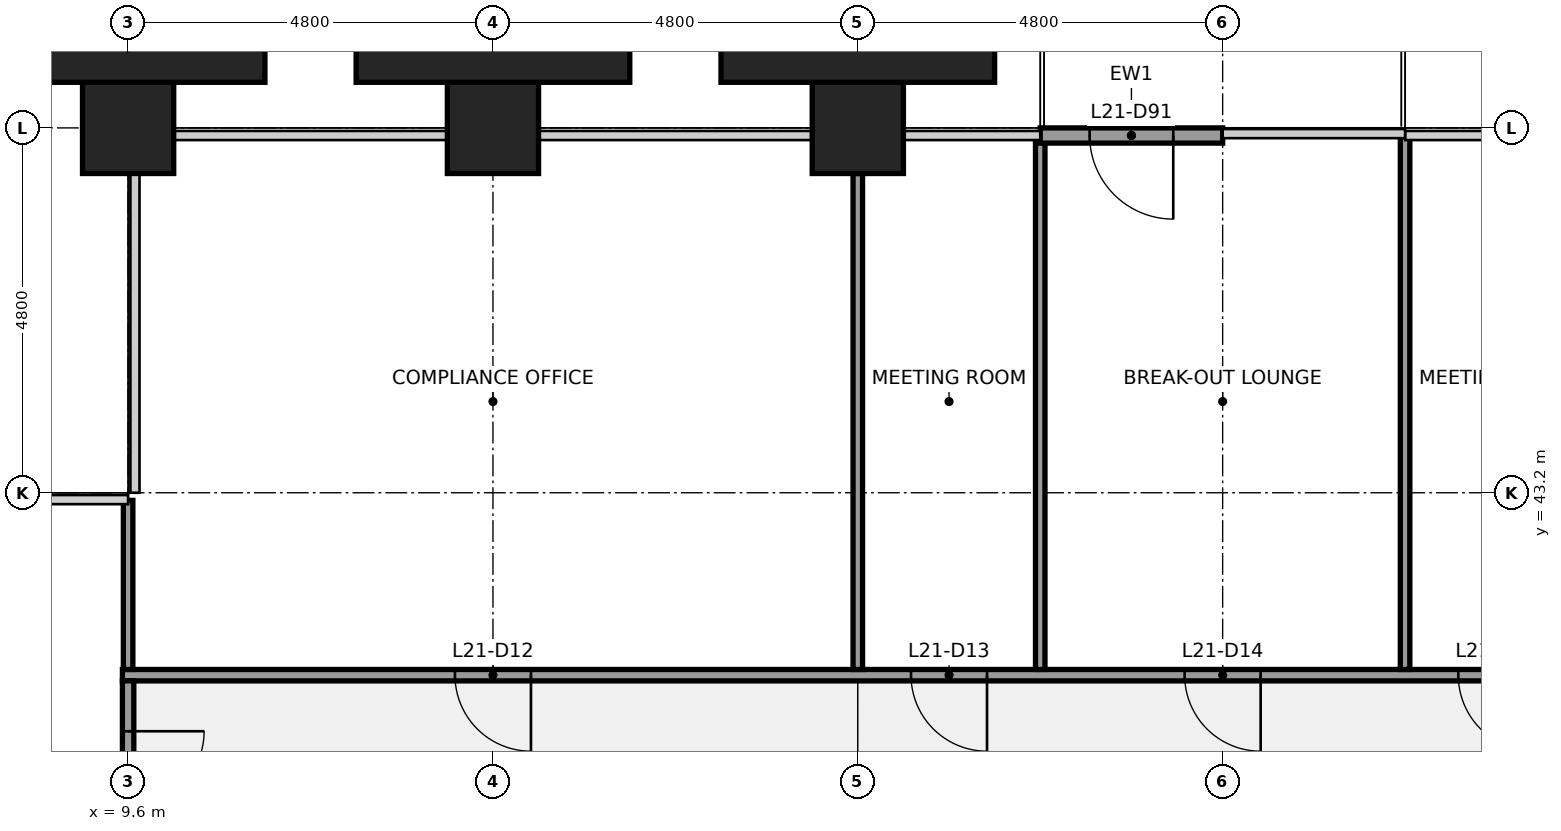
"""IFC4 building model, lengths in metres.
Left out: names, types, materials, properties, quantities, classifications, styles, units other than length and angle.
Written with IfcOpenShell. Run it as: python <this file> out.ifc"""

import sys

from ifc_helpers import new_model, si_unit, direction, frame, frame_2d, origin, origin_2d, place, context, subcontext, project, spatial, rectangle, extrude, element, fill, save


model = new_model("IFC4")
c1 = context("Model", 3, precision=1e-05, world=origin(), true_north=direction((0.0, 1.0)))
c2 = subcontext(c1, "Body", "Model", "MODEL_VIEW")
j1 = project(units=[si_unit("LENGTHUNIT", "METRE"), si_unit("PLANEANGLEUNIT", "RADIAN")], contexts=[c1])
p1 = place(None, origin())
s1 = spatial("IfcSite", under=j1, at=p1, CompositionType="ELEMENT")
p2 = place(p1, origin())
s2 = spatial("IfcBuilding", under=s1, at=p2, CompositionType="ELEMENT")
p3 = place(p2, frame((0.0, 0.0, 104.1)))
s3 = spatial("IfcBuildingStorey", under=s2, at=p3, CompositionType="ELEMENT", Elevation=104.1)
for number, where, z_axis, x_axis in (
    (1, (9.6, 48.0, 0.0), (0.0, 0.0, 1.0), (1.0, 0.0, 0.0)),
    (2, (14.4, 48.0, 0.0), (0.0, 0.0, 1.0), (1.0, 0.0, 0.0)),
    (3, (19.2, 48.0, 0.0), (0.0, 0.0, 1.0), (1.0, 0.0, 0.0)),
):
    element("IfcColumn", number, at=place(p3, frame(where, z_axis=z_axis, x_axis=x_axis)), inside=s3, PredefinedType="COLUMN", context=c2, shape_type="SweptSolid", body=[
        extrude(rectangle(XDim=1.2, YDim=1.2, at=origin_2d()), origin(), (0.0, 0.0, 1.0), 4.0),
    ])
p4 = place(p3, frame((9.525, 40.8, 0.0), z_axis=(0.0, 0.0, 1.0), x_axis=(1.0, 0.0, 0.0)))
e4 = element("IfcWall", 4, at=p4, inside=s3, PredefinedType="PARTITIONING", context=c2, shape_type="SweptSolid", body=[
    extrude(rectangle(XDim=38.55, YDim=0.15, at=frame_2d((19.275, 0.0))), origin(), (0.0, 0.0, 1.0), 2.936),
])
p5 = place(p4, frame((4.375, 0.0, 0.0)))
e5 = element("IfcOpeningElement", 5, at=p5, cuts=e4, PredefinedType="OPENING", context=c2, shape_type="SweptSolid", body=[
    extrude(rectangle(XDim=1.0, YDim=2.1, at=frame_2d((0.5, 1.05))), frame((0.0, 0.085, 0.0), z_axis=(0.0, -1.0, 0.0), x_axis=(1.0, 0.0, 0.0)), (0.0, 0.0, 1.0), 0.17),
])
p6 = place(p4, frame((10.375, 0.0, 0.0)))
e6 = element("IfcOpeningElement", 6, at=p6, cuts=e4, PredefinedType="OPENING", context=c2, shape_type="SweptSolid", body=[
    extrude(rectangle(XDim=1.0, YDim=2.1, at=frame_2d((0.5, 1.05))), frame((0.0, 0.085, 0.0), z_axis=(0.0, -1.0, 0.0), x_axis=(1.0, 0.0, 0.0)), (0.0, 0.0, 1.0), 0.17),
])
p7 = place(p4, frame((13.975, 0.0, 0.0)))
e7 = element("IfcOpeningElement", 7, at=p7, cuts=e4, PredefinedType="OPENING", context=c2, shape_type="SweptSolid", body=[
    extrude(rectangle(XDim=1.0, YDim=2.1, at=frame_2d((0.5, 1.05))), frame((0.0, 0.085, 0.0), z_axis=(0.0, -1.0, 0.0), x_axis=(1.0, 0.0, 0.0)), (0.0, 0.0, 1.0), 0.17),
])
p8 = place(p4, frame((17.575, 0.0, 0.0)))
e8 = element("IfcOpeningElement", 8, at=p8, cuts=e4, PredefinedType="OPENING", context=c2, shape_type="SweptSolid", body=[
    extrude(rectangle(XDim=1.0, YDim=2.1, at=frame_2d((0.5, 1.05))), frame((0.0, 0.085, 0.0), z_axis=(0.0, -1.0, 0.0), x_axis=(1.0, 0.0, 0.0)), (0.0, 0.0, 1.0), 0.17),
])
p9 = place(p4, frame((19.975, 0.0, 0.0)))
e9 = element("IfcOpeningElement", 9, at=p9, cuts=e4, PredefinedType="OPENING", context=c2, shape_type="SweptSolid", body=[
    extrude(rectangle(XDim=1.0, YDim=2.1, at=frame_2d((0.5, 1.05))), frame((0.0, 0.085, 0.0), z_axis=(0.0, -1.0, 0.0), x_axis=(1.0, 0.0, 0.0)), (0.0, 0.0, 1.0), 0.17),
])
p10 = place(p4, frame((24.775, 0.0, 0.0)))
e10 = element("IfcOpeningElement", 10, at=p10, cuts=e4, PredefinedType="OPENING", context=c2, shape_type="SweptSolid", body=[
    extrude(rectangle(XDim=1.0, YDim=2.1, at=frame_2d((0.5, 1.05))), frame((0.0, 0.085, 0.0), z_axis=(0.0, -1.0, 0.0), x_axis=(1.0, 0.0, 0.0)), (0.0, 0.0, 1.0), 0.17),
])
p11 = place(p4, frame((33.175, 0.0, 0.0)))
e11 = element("IfcOpeningElement", 11, at=p11, cuts=e4, PredefinedType="OPENING", context=c2, shape_type="SweptSolid", body=[
    extrude(rectangle(XDim=1.0, YDim=2.1, at=frame_2d((0.5, 1.05))), frame((0.0, 0.085, 0.0), z_axis=(0.0, -1.0, 0.0), x_axis=(1.0, 0.0, 0.0)), (0.0, 0.0, 1.0), 0.17),
])
p12 = place(p3, frame((9.6, 40.875, 0.0), z_axis=(0.0, 0.0, 1.0), x_axis=(0.0, 1.0, 0.0)))
e12 = element("IfcWall", 12, at=p12, inside=s3, PredefinedType="PARTITIONING", context=c2, shape_type="SweptSolid", body=[
    extrude(rectangle(XDim=2.225, YDim=0.125, at=frame_2d((1.113, 0.0))), origin(), (0.0, 0.0, 1.0), 2.936),
])
p13 = place(p3, frame((9.6, 38.4, 0.0), z_axis=(0.0, 0.0, 1.0), x_axis=(0.0, 1.0, 0.0)))
e13 = element("IfcWall", 13, at=p13, inside=s3, PredefinedType="PARTITIONING", context=c2, shape_type="SweptSolid", body=[
    extrude(rectangle(XDim=2.325, YDim=0.15, at=frame_2d((1.163, 0.0))), origin(), (0.0, 0.0, 1.0), 2.936),
])
p14 = place(p13, frame((0.663, 0.0, 0.0)))
e14 = element("IfcOpeningElement", 14, at=p14, cuts=e13, PredefinedType="OPENING", context=c2, shape_type="SweptSolid", body=[
    extrude(rectangle(XDim=1.0, YDim=2.1, at=frame_2d((0.5, 1.05))), frame((0.0, 0.085, 0.0), z_axis=(0.0, -1.0, 0.0), x_axis=(1.0, 0.0, 0.0)), (0.0, 0.0, 1.0), 0.17),
])
p15 = place(p3, frame((19.2, 40.875, 0.0), z_axis=(0.0, 0.0, 1.0), x_axis=(0.0, 1.0, 0.0)))
e15 = element("IfcWall", 15, at=p15, inside=s3, PredefinedType="PARTITIONING", context=c2, shape_type="SweptSolid", body=[
    extrude(rectangle(XDim=6.525, YDim=0.125, at=frame_2d((3.262, 0.0))), origin(), (0.0, 0.0, 1.0), 2.936),
])
for number, where, z_axis, x_axis in (
    (16, (21.6, 40.875, 0.0), (0.0, 0.0, 1.0), (0.0, 1.0, 0.0)),
    (17, (26.4, 40.875, 0.0), (0.0, 0.0, 1.0), (0.0, 1.0, 0.0)),
):
    element("IfcWall", number, at=place(p3, frame(where, z_axis=z_axis, x_axis=x_axis)), inside=s3, PredefinedType="PARTITIONING", context=c2, shape_type="SweptSolid", body=[
        extrude(rectangle(XDim=7.025, YDim=0.125, at=frame_2d((3.512, 0.0))), origin(), (0.0, 0.0, 1.0), 2.936),
    ])
p16 = place(p3, frame((24.0, 47.9, 0.0), z_axis=(0.0, 0.0, 1.0), x_axis=(-1.0, 0.0, 0.0)))
e18 = element("IfcWall", 18, at=p16, inside=s3, PredefinedType="SOLIDWALL", context=c2, shape_type="SweptSolid", body=[
    extrude(rectangle(XDim=2.4, YDim=0.2, at=frame_2d((1.2, 0.0))), origin(), (0.0, 0.0, 1.0), 3.314),
])
p17 = place(p16, frame((0.65, 0.0, 0.0)))
e19 = element("IfcOpeningElement", 19, at=p17, cuts=e18, PredefinedType="OPENING", context=c2, shape_type="SweptSolid", body=[
    extrude(rectangle(XDim=1.1, YDim=2.1, at=frame_2d((0.55, 1.05))), frame((0.0, 0.11, 0.0), z_axis=(0.0, -1.0, 0.0), x_axis=(1.0, 0.0, 0.0)), (0.0, 0.0, 1.0), 0.22),
])
for number, where, z_axis, x_axis in (
    (20, (9.6, 49.05, 0.0), (0.0, 0.0, 1.0), (1.0, 0.0, 0.0)),
    (21, (14.4, 49.05, 0.0), (0.0, 0.0, 1.0), (1.0, 0.0, 0.0)),
    (22, (19.2, 49.05, 0.0), (0.0, 0.0, 1.0), (1.0, 0.0, 0.0)),
):
    element("IfcColumn", number, at=place(p3, frame(where, z_axis=z_axis, x_axis=x_axis)), inside=s3, PredefinedType="PILASTER", context=c2, shape_type="SweptSolid", body=[
        extrude(rectangle(XDim=3.6, YDim=0.9, at=origin_2d()), origin(), (0.0, 0.0, 1.0), 4.0),
    ])
p18 = place(p5, origin())
e23 = element("IfcDoor", 23, at=p18, inside=s3, OperationType="SINGLE_SWING_RIGHT", PredefinedType="DOOR", context=c2, shape_type="SweptSolid", body=[
    extrude(rectangle(XDim=1.0, YDim=2.1, at=frame_2d((0.5, 1.05))), frame((0.0, 0.025, 0.0), z_axis=(0.0, -1.0, 0.0), x_axis=(1.0, 0.0, 0.0)), (0.0, 0.0, 1.0), 0.05),
])
fill(e5, e23)
p19 = place(p6, origin())
e24 = element("IfcDoor", 24, at=p19, inside=s3, OperationType="SINGLE_SWING_RIGHT", PredefinedType="DOOR", context=c2, shape_type="SweptSolid", body=[
    extrude(rectangle(XDim=1.0, YDim=2.1, at=frame_2d((0.5, 1.05))), frame((0.0, 0.025, 0.0), z_axis=(0.0, -1.0, 0.0), x_axis=(1.0, 0.0, 0.0)), (0.0, 0.0, 1.0), 0.05),
])
fill(e6, e24)
p20 = place(p7, origin())
e25 = element("IfcDoor", 25, at=p20, inside=s3, OperationType="SINGLE_SWING_RIGHT", PredefinedType="DOOR", context=c2, shape_type="SweptSolid", body=[
    extrude(rectangle(XDim=1.0, YDim=2.1, at=frame_2d((0.5, 1.05))), frame((0.0, 0.025, 0.0), z_axis=(0.0, -1.0, 0.0), x_axis=(1.0, 0.0, 0.0)), (0.0, 0.0, 1.0), 0.05),
])
fill(e7, e25)
p21 = place(p8, origin())
e26 = element("IfcDoor", 26, at=p21, inside=s3, OperationType="SINGLE_SWING_RIGHT", PredefinedType="DOOR", context=c2, shape_type="SweptSolid", body=[
    extrude(rectangle(XDim=1.0, YDim=2.1, at=frame_2d((0.5, 1.05))), frame((0.0, 0.025, 0.0), z_axis=(0.0, -1.0, 0.0), x_axis=(1.0, 0.0, 0.0)), (0.0, 0.0, 1.0), 0.05),
])
fill(e8, e26)
p22 = place(p14, origin())
e27 = element("IfcDoor", 27, at=p22, inside=s3, OperationType="SINGLE_SWING_RIGHT", PredefinedType="DOOR", context=c2, shape_type="SweptSolid", body=[
    extrude(rectangle(XDim=1.0, YDim=2.1, at=frame_2d((0.5, 1.05))), frame((0.0, 0.025, 0.0), z_axis=(0.0, -1.0, 0.0), x_axis=(1.0, 0.0, 0.0)), (0.0, 0.0, 1.0), 0.05),
])
fill(e14, e27)
p23 = place(p17, origin())
e28 = element("IfcDoor", 28, at=p23, inside=s3, OperationType="SINGLE_SWING_LEFT", PredefinedType="DOOR", context=c2, shape_type="SweptSolid", body=[
    extrude(rectangle(XDim=1.1, YDim=2.1, at=frame_2d((0.55, 1.05))), frame((0.0, 0.025, 0.0), z_axis=(0.0, -1.0, 0.0), x_axis=(1.0, 0.0, 0.0)), (0.0, 0.0, 1.0), 0.05),
])
fill(e19, e28)
save(model, sys.argv[1])
